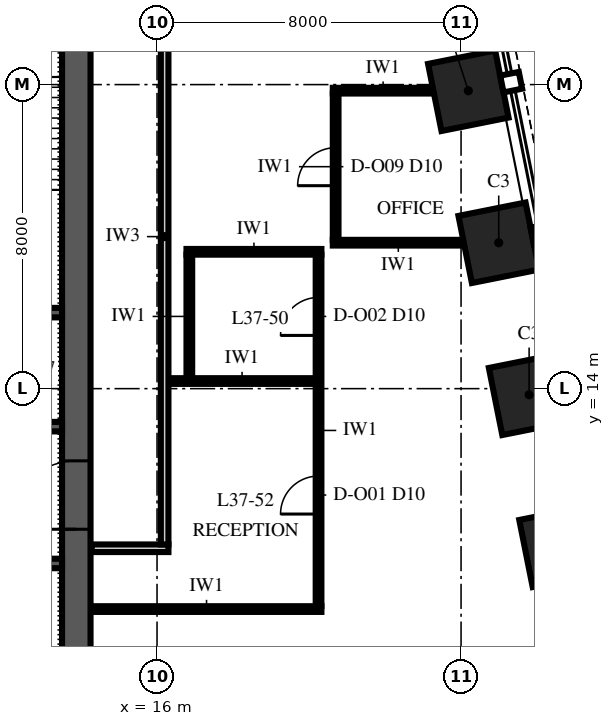
"""IFC4 building model, lengths in metres.
Left out: names, types, materials, properties, quantities, classifications, styles, units other than length and angle.
Written with IfcOpenShell. Run it as: python <this file> out.ifc"""

import sys

from ifc_helpers import new_model, si_unit, direction, frame, frame_2d, origin, origin_2d, place, context, subcontext, project, spatial, polyline, rectangle, outline, extrude, element, fill, save


model = new_model("IFC4")
c1 = context("Model", 3, precision=1e-05, world=origin(), true_north=direction((0.0, 1.0)))
c2 = subcontext(c1, "Body", "Model", "MODEL_VIEW")
j1 = project(units=[si_unit("LENGTHUNIT", "METRE"), si_unit("PLANEANGLEUNIT", "RADIAN")], contexts=[c1])
p1 = place(None, origin())
s1 = spatial("IfcSite", under=j1, at=p1, CompositionType="ELEMENT")
p2 = place(p1, origin())
s2 = spatial("IfcBuilding", under=s1, at=p2, CompositionType="ELEMENT")
p3 = place(p2, frame((0.0, 0.0, 163.0)))
s3 = spatial("IfcBuildingStorey", under=s2, at=p3, CompositionType="ELEMENT", Elevation=163.0)
for number, where, z_axis, x_axis in (
    (1, (26.591, 9.838, 0.0), (0.0, 0.0, 1.0), (-0.196, 0.981, 0.0)),
    (2, (25.791, 13.838, 0.0), (0.0, 0.0, 1.0), (-0.196, 0.981, 0.0)),
    (3, (24.991, 17.838, 0.0), (0.0, 0.0, 1.0), (-0.196, 0.981, 0.0)),
    (4, (24.191, 21.838, 0.0), (0.0, 0.0, 1.0), (-0.196, 0.981, 0.0)),
):
    element("IfcColumn", number, at=place(p3, frame(where, z_axis=z_axis, x_axis=x_axis)), inside=s3, PredefinedType="COLUMN", context=c2, shape_type="SweptSolid", body=[
        extrude(rectangle(XDim=1.8, YDim=1.8, at=origin_2d()), origin(), (0.0, 0.0, 1.0), 4.0),
    ])
p4 = place(p3, frame((13.875, 6.125, 0.0), z_axis=(0.0, 0.0, 1.0), x_axis=(0.0, 1.0, 0.0)))
e5 = element("IfcWall", 5, at=p4, inside=s3, PredefinedType="SHEAR", context=c2, shape_type="SweptSolid", body=[
    extrude(outline(polyline([(0.0, -0.375), (17.75, -0.375), (17.75, 0.0), (17.375, 0.0), (17.375, 0.375), (0.375, 0.375), (0.375, 0.0), (0.0, 0.0), (0.0, -0.375)])), origin(), (0.0, 0.0, 1.0), 4.0),
])
p5 = place(p4, frame((4.175, 0.0, 0.0)))
e6 = element("IfcOpeningElement", 6, at=p5, cuts=e5, PredefinedType="OPENING", context=c2, shape_type="SweptSolid", body=[
    extrude(rectangle(XDim=1.8, YDim=2.4, at=frame_2d((0.9, 1.2))), frame((0.0, 0.39, 0.0), z_axis=(0.0, -1.0, 0.0), x_axis=(1.0, 0.0, 0.0)), (0.0, 0.0, 1.0), 0.78),
])
p6 = place(p3, frame((-13.5, 9.4, 0.0), z_axis=(0.0, 0.0, 1.0), x_axis=(1.0, 0.0, 0.0)))
e7 = element("IfcWall", 7, at=p6, inside=s3, PredefinedType="SHEAR", context=c2, shape_type="SweptSolid", body=[
    extrude(rectangle(XDim=27.0, YDim=0.25, at=frame_2d((13.5, 0.0))), origin(), (0.0, 0.0, 1.0), 4.0),
])
p7 = place(p6, frame((0.35, 0.0, 0.0)))
e8 = element("IfcOpeningElement", 8, at=p7, cuts=e7, PredefinedType="OPENING", context=c2, shape_type="SweptSolid", body=[
    extrude(rectangle(XDim=1.1, YDim=2.1, at=frame_2d((0.55, 1.05))), frame((0.0, 0.14, 0.0), z_axis=(0.0, -1.0, 0.0), x_axis=(1.0, 0.0, 0.0)), (0.0, 0.0, 1.0), 0.28),
])
p8 = place(p6, frame((3.15, 0.0, 0.0)))
e9 = element("IfcOpeningElement", 9, at=p8, cuts=e7, PredefinedType="OPENING", context=c2, shape_type="SweptSolid", body=[
    extrude(rectangle(XDim=1.1, YDim=2.1, at=frame_2d((0.55, 1.05))), frame((0.0, 0.14, 0.0), z_axis=(0.0, -1.0, 0.0), x_axis=(1.0, 0.0, 0.0)), (0.0, 0.0, 1.0), 0.28),
])
p9 = place(p6, frame((5.95, 0.0, 0.0)))
e10 = element("IfcOpeningElement", 10, at=p9, cuts=e7, PredefinedType="OPENING", context=c2, shape_type="SweptSolid", body=[
    extrude(rectangle(XDim=1.1, YDim=2.1, at=frame_2d((0.55, 1.05))), frame((0.0, 0.14, 0.0), z_axis=(0.0, -1.0, 0.0), x_axis=(1.0, 0.0, 0.0)), (0.0, 0.0, 1.0), 0.28),
])
p10 = place(p6, frame((8.75, 0.0, 0.0)))
e11 = element("IfcOpeningElement", 11, at=p10, cuts=e7, PredefinedType="OPENING", context=c2, shape_type="SweptSolid", body=[
    extrude(rectangle(XDim=1.1, YDim=2.1, at=frame_2d((0.55, 1.05))), frame((0.0, 0.14, 0.0), z_axis=(0.0, -1.0, 0.0), x_axis=(1.0, 0.0, 0.0)), (0.0, 0.0, 1.0), 0.28),
])
p11 = place(p6, frame((11.55, 0.0, 0.0)))
e12 = element("IfcOpeningElement", 12, at=p11, cuts=e7, PredefinedType="OPENING", context=c2, shape_type="SweptSolid", body=[
    extrude(rectangle(XDim=1.1, YDim=2.1, at=frame_2d((0.55, 1.05))), frame((0.0, 0.14, 0.0), z_axis=(0.0, -1.0, 0.0), x_axis=(1.0, 0.0, 0.0)), (0.0, 0.0, 1.0), 0.28),
])
p12 = place(p6, frame((14.35, 0.0, 0.0)))
e13 = element("IfcOpeningElement", 13, at=p12, cuts=e7, PredefinedType="OPENING", context=c2, shape_type="SweptSolid", body=[
    extrude(rectangle(XDim=1.1, YDim=2.1, at=frame_2d((0.55, 1.05))), frame((0.0, 0.14, 0.0), z_axis=(0.0, -1.0, 0.0), x_axis=(1.0, 0.0, 0.0)), (0.0, 0.0, 1.0), 0.28),
])
p13 = place(p3, frame((-13.5, 13.0, 0.0), z_axis=(0.0, 0.0, 1.0), x_axis=(1.0, 0.0, 0.0)))
e14 = element("IfcWall", 14, at=p13, inside=s3, PredefinedType="SHEAR", context=c2, shape_type="SweptSolid", body=[
    extrude(rectangle(XDim=27.0, YDim=0.25, at=frame_2d((13.5, 0.0))), origin(), (0.0, 0.0, 1.0), 4.0),
])
p14 = place(p13, frame((0.35, 0.0, 0.0)))
e15 = element("IfcOpeningElement", 15, at=p14, cuts=e14, PredefinedType="OPENING", context=c2, shape_type="SweptSolid", body=[
    extrude(rectangle(XDim=1.1, YDim=2.1, at=frame_2d((0.55, 1.05))), frame((0.0, 0.14, 0.0), z_axis=(0.0, -1.0, 0.0), x_axis=(1.0, 0.0, 0.0)), (0.0, 0.0, 1.0), 0.28),
])
p15 = place(p13, frame((3.15, 0.0, 0.0)))
e16 = element("IfcOpeningElement", 16, at=p15, cuts=e14, PredefinedType="OPENING", context=c2, shape_type="SweptSolid", body=[
    extrude(rectangle(XDim=1.1, YDim=2.1, at=frame_2d((0.55, 1.05))), frame((0.0, 0.14, 0.0), z_axis=(0.0, -1.0, 0.0), x_axis=(1.0, 0.0, 0.0)), (0.0, 0.0, 1.0), 0.28),
])
p16 = place(p13, frame((5.95, 0.0, 0.0)))
e17 = element("IfcOpeningElement", 17, at=p16, cuts=e14, PredefinedType="OPENING", context=c2, shape_type="SweptSolid", body=[
    extrude(rectangle(XDim=1.1, YDim=2.1, at=frame_2d((0.55, 1.05))), frame((0.0, 0.14, 0.0), z_axis=(0.0, -1.0, 0.0), x_axis=(1.0, 0.0, 0.0)), (0.0, 0.0, 1.0), 0.28),
])
p17 = place(p13, frame((15.25, 0.0, 0.0)))
e18 = element("IfcOpeningElement", 18, at=p17, cuts=e14, PredefinedType="OPENING", context=c2, shape_type="SweptSolid", body=[
    extrude(rectangle(XDim=0.9, YDim=2.1, at=frame_2d((0.45, 1.05))), frame((0.0, 0.14, 0.0), z_axis=(0.0, -1.0, 0.0), x_axis=(1.0, 0.0, 0.0)), (0.0, 0.0, 1.0), 0.28),
])
p18 = place(p13, frame((17.65, 0.0, 0.0)))
e19 = element("IfcOpeningElement", 19, at=p18, cuts=e14, PredefinedType="OPENING", context=c2, shape_type="SweptSolid", body=[
    extrude(rectangle(XDim=0.9, YDim=2.1, at=frame_2d((0.45, 1.05))), frame((0.0, 0.14, 0.0), z_axis=(0.0, -1.0, 0.0), x_axis=(1.0, 0.0, 0.0)), (0.0, 0.0, 1.0), 0.28),
])
p19 = place(p13, frame((21.05, 0.0, 0.0)))
e20 = element("IfcOpeningElement", 20, at=p19, cuts=e14, PredefinedType="OPENING", context=c2, shape_type="SweptSolid", body=[
    extrude(rectangle(XDim=0.9, YDim=2.1, at=frame_2d((0.45, 1.05))), frame((0.0, 0.14, 0.0), z_axis=(0.0, -1.0, 0.0), x_axis=(1.0, 0.0, 0.0)), (0.0, 0.0, 1.0), 0.28),
])
p20 = place(p3, frame((-13.5, 16.0, 0.0), z_axis=(0.0, 0.0, 1.0), x_axis=(1.0, 0.0, 0.0)))
e21 = element("IfcWall", 21, at=p20, inside=s3, PredefinedType="SHEAR", context=c2, shape_type="SweptSolid", body=[
    extrude(rectangle(XDim=27.0, YDim=0.25, at=frame_2d((13.5, 0.0))), origin(), (0.0, 0.0, 1.0), 4.0),
])
p21 = place(p3, frame((14.28, 8.2, 0.0), z_axis=(0.0, 0.0, 1.0), x_axis=(1.0, 0.0, 0.0)))
e22 = element("IfcWall", 22, at=p21, inside=s3, PredefinedType="PARTITIONING", context=c2, shape_type="SweptSolid", body=[
    extrude(rectangle(XDim=6.045, YDim=0.15, at=frame_2d((3.022, 0.0))), origin(), (0.0, 0.0, 1.0), 3.75),
])
p22 = place(p3, frame((14.28, 9.8, 0.0), z_axis=(0.0, 0.0, 1.0), x_axis=(1.0, 0.0, 0.0)))
e23 = element("IfcWall", 23, at=p22, inside=s3, PredefinedType="PARTITIONING", context=c2, shape_type="SweptSolid", body=[
    extrude(rectangle(XDim=2.02, YDim=0.2, at=frame_2d((1.01, 0.0))), origin(), (0.0, 0.0, 1.0), 3.75),
])
p23 = place(p3, frame((16.3, 14.2, 0.0), z_axis=(0.0, 0.0, 1.0), x_axis=(1.0, 0.0, 0.0)))
e24 = element("IfcWall", 24, at=p23, inside=s3, PredefinedType="PARTITIONING", context=c2, shape_type="SweptSolid", body=[
    extrude(rectangle(XDim=3.875, YDim=0.15, at=frame_2d((1.938, 0.0))), origin(), (0.0, 0.0, 1.0), 3.13),
])
p24 = place(p3, frame((16.775, 17.6, 0.0), z_axis=(0.0, 0.0, 1.0), x_axis=(1.0, 0.0, 0.0)))
e25 = element("IfcWall", 25, at=p24, inside=s3, PredefinedType="PARTITIONING", context=c2, shape_type="SweptSolid", body=[
    extrude(rectangle(XDim=3.55, YDim=0.15, at=frame_2d((1.775, 0.0))), origin(), (0.0, 0.0, 1.0), 3.75),
])
p25 = place(p3, frame((20.625, 17.84, 0.0), z_axis=(0.0, 0.0, 1.0), x_axis=(1.0, 0.0, 0.0)))
e26 = element("IfcWall", 26, at=p25, inside=s3, PredefinedType="PARTITIONING", context=c2, shape_type="SweptSolid", body=[
    extrude(rectangle(XDim=3.448, YDim=0.15, at=frame_2d((1.724, 0.0))), origin(), (0.0, 0.0, 1.0), 3.13),
])
p26 = place(p3, frame((20.625, 21.84, 0.0), z_axis=(0.0, 0.0, 1.0), x_axis=(1.0, 0.0, 0.0)))
e27 = element("IfcWall", 27, at=p26, inside=s3, PredefinedType="PARTITIONING", context=c2, shape_type="SweptSolid", body=[
    extrude(rectangle(XDim=2.648, YDim=0.15, at=frame_2d((1.324, 0.0))), origin(), (0.0, 0.0, 1.0), 3.13),
])
p27 = place(p3, frame((16.2, 9.9, 0.0), z_axis=(0.0, 0.0, 1.0), x_axis=(0.0, 1.0, 0.0)))
e28 = element("IfcWall", 28, at=p27, inside=s3, PredefinedType="PARTITIONING", context=c2, shape_type="SweptSolid", body=[
    extrude(rectangle(XDim=16.2, YDim=0.2, at=frame_2d((8.1, 0.0))), origin(), (0.0, 0.0, 1.0), 3.13),
])
p28 = place(p27, frame((14.7, 0.0, 0.0)))
e29 = element("IfcOpeningElement", 29, at=p28, cuts=e28, PredefinedType="OPENING", context=c2, shape_type="SweptSolid", body=[
    extrude(rectangle(XDim=1.2, YDim=2.4, at=frame_2d((0.6, 1.2))), frame((0.0, 0.115, 0.0), z_axis=(0.0, -1.0, 0.0), x_axis=(1.0, 0.0, 0.0)), (0.0, 0.0, 1.0), 0.23),
])
p29 = place(p3, frame((16.85, 14.275, 0.0), z_axis=(0.0, 0.0, 1.0), x_axis=(0.0, 1.0, 0.0)))
e30 = element("IfcWall", 30, at=p29, inside=s3, PredefinedType="PARTITIONING", context=c2, shape_type="SweptSolid", body=[
    extrude(rectangle(XDim=3.25, YDim=0.15, at=frame_2d((1.625, 0.0))), origin(), (0.0, 0.0, 1.0), 3.13),
])
p30 = place(p3, frame((20.25, 8.275, 0.0), z_axis=(0.0, 0.0, 1.0), x_axis=(0.0, 1.0, 0.0)))
e31 = element("IfcWall", 31, at=p30, inside=s3, PredefinedType="PARTITIONING", context=c2, shape_type="SweptSolid", body=[
    extrude(rectangle(XDim=9.25, YDim=0.15, at=frame_2d((4.625, 0.0))), origin(), (0.0, 0.0, 1.0), 3.13),
])
p31 = place(p30, frame((2.425, 0.0, 0.0)))
e32 = element("IfcOpeningElement", 32, at=p31, cuts=e31, PredefinedType="OPENING", context=c2, shape_type="SweptSolid", body=[
    extrude(rectangle(XDim=1.0, YDim=2.3, at=frame_2d((0.5, 1.15))), frame((0.0, 0.09, 0.0), z_axis=(0.0, -1.0, 0.0), x_axis=(1.0, 0.0, 0.0)), (0.0, 0.0, 1.0), 0.18),
])
p32 = place(p30, frame((7.125, 0.0, 0.0)))
e33 = element("IfcOpeningElement", 33, at=p32, cuts=e31, PredefinedType="OPENING", context=c2, shape_type="SweptSolid", body=[
    extrude(rectangle(XDim=1.0, YDim=2.3, at=frame_2d((0.5, 1.15))), frame((0.0, 0.09, 0.0), z_axis=(0.0, -1.0, 0.0), x_axis=(1.0, 0.0, 0.0)), (0.0, 0.0, 1.0), 0.18),
])
p33 = place(p3, frame((20.7, 17.915, 0.0), z_axis=(0.0, 0.0, 1.0), x_axis=(0.0, 1.0, 0.0)))
e34 = element("IfcWall", 34, at=p33, inside=s3, PredefinedType="PARTITIONING", context=c2, shape_type="SweptSolid", body=[
    extrude(rectangle(XDim=3.85, YDim=0.15, at=frame_2d((1.925, 0.0))), origin(), (0.0, 0.0, 1.0), 3.13),
])
p34 = place(p33, frame((1.425, 0.0, 0.0)))
e35 = element("IfcOpeningElement", 35, at=p34, cuts=e34, PredefinedType="OPENING", context=c2, shape_type="SweptSolid", body=[
    extrude(rectangle(XDim=1.0, YDim=2.3, at=frame_2d((0.5, 1.15))), frame((0.0, 0.09, 0.0), z_axis=(0.0, -1.0, 0.0), x_axis=(1.0, 0.0, 0.0)), (0.0, 0.0, 1.0), 0.18),
])
p35 = place(p5, origin())
e36 = element("IfcDoor", 36, at=p35, inside=s3, OperationType="DOUBLE_DOOR_SINGLE_SWING", PredefinedType="DOOR", context=c2, shape_type="SweptSolid", body=[
    extrude(rectangle(XDim=1.8, YDim=2.4, at=frame_2d((0.9, 1.2))), frame((0.0, 0.375, 0.0), z_axis=(0.0, -1.0, 0.0), x_axis=(1.0, 0.0, 0.0)), (0.0, 0.0, 1.0), 0.75),
])
fill(e6, e36)
p36 = place(p31, origin())
e37 = element("IfcDoor", 37, at=p36, inside=s3, OperationType="SINGLE_SWING_LEFT", PredefinedType="DOOR", context=c2, shape_type="SweptSolid", body=[
    extrude(rectangle(XDim=1.0, YDim=2.3, at=frame_2d((0.5, 1.15))), frame((0.0, 0.075, 0.0), z_axis=(0.0, -1.0, 0.0), x_axis=(1.0, 0.0, 0.0)), (0.0, 0.0, 1.0), 0.149),
])
fill(e32, e37)
p37 = place(p32, origin())
e38 = element("IfcDoor", 38, at=p37, inside=s3, OperationType="SINGLE_SWING_LEFT", PredefinedType="DOOR", context=c2, shape_type="SweptSolid", body=[
    extrude(rectangle(XDim=1.0, YDim=2.3, at=frame_2d((0.5, 1.15))), frame((0.0, 0.075, 0.0), z_axis=(0.0, -1.0, 0.0), x_axis=(1.0, 0.0, 0.0)), (0.0, 0.0, 1.0), 0.149),
])
fill(e33, e38)
p38 = place(p34, origin())
e39 = element("IfcDoor", 39, at=p38, inside=s3, OperationType="SINGLE_SWING_LEFT", PredefinedType="DOOR", context=c2, shape_type="SweptSolid", body=[
    extrude(rectangle(XDim=1.0, YDim=2.3, at=frame_2d((0.5, 1.15))), frame((0.0, 0.075, 0.0), z_axis=(0.0, -1.0, 0.0), x_axis=(1.0, 0.0, 0.0)), (0.0, 0.0, 1.0), 0.149),
])
fill(e35, e39)
save(model, sys.argv[1])
